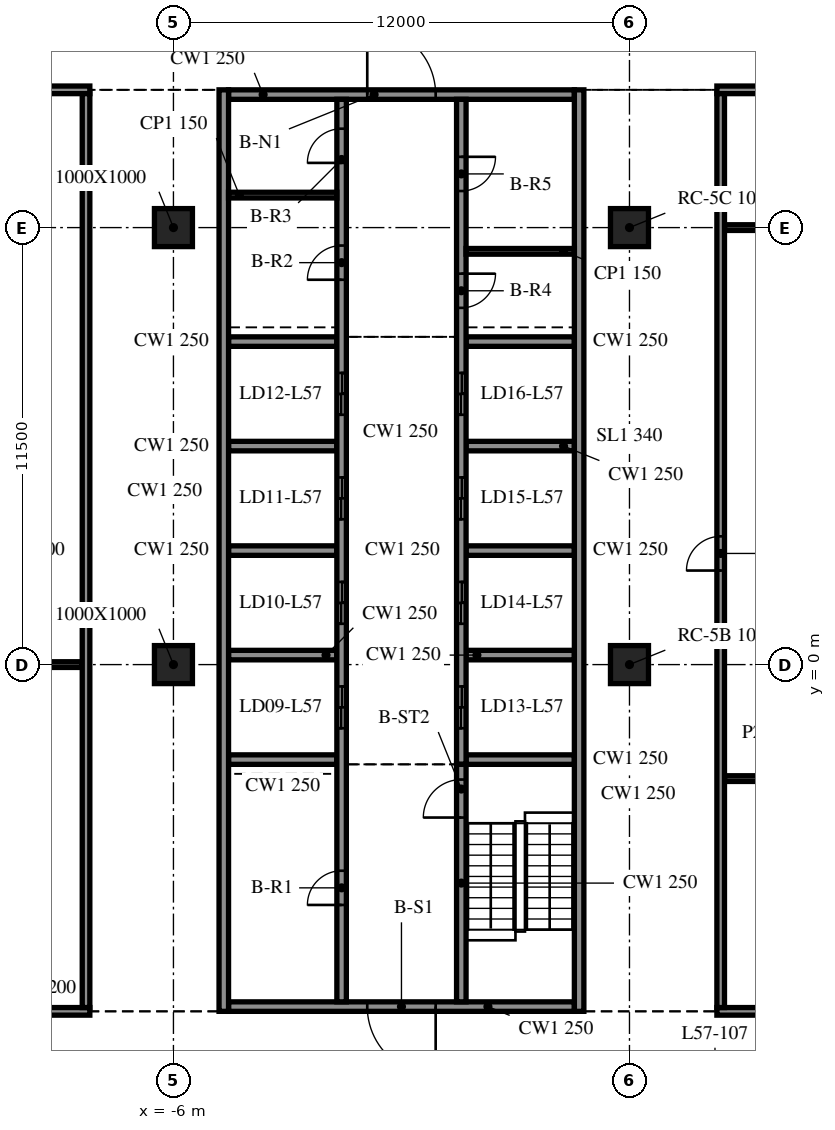
"""IFC4 building model, lengths in metres.
Left out: names, types, materials, properties, quantities, classifications, styles, units other than length and angle.
Written with IfcOpenShell. Run it as: python <this file> out.ifc"""

import sys

from ifc_helpers import new_model, si_unit, direction, frame, frame_2d, origin, origin_2d, place, context, subcontext, project, spatial, rectangle, extrude, element, fill, save


model = new_model("IFC4")
c1 = context("Model", 3, precision=1e-05, world=origin(), true_north=direction((0.0, 1.0)))
c2 = subcontext(c1, "Body", "Model", "MODEL_VIEW")
j1 = project(units=[si_unit("LENGTHUNIT", "METRE"), si_unit("PLANEANGLEUNIT", "RADIAN")], contexts=[c1])
p1 = place(None, origin())
s1 = spatial("IfcSite", under=j1, at=p1, CompositionType="ELEMENT")
p2 = place(p1, origin())
s2 = spatial("IfcBuilding", under=s1, at=p2, CompositionType="ELEMENT")
p3 = place(p2, frame((0.0, 0.0, 236.2)))
s3 = spatial("IfcBuildingStorey", under=s2, at=p3, CompositionType="ELEMENT", Elevation=236.2)
for number, where, z_axis, x_axis in (
    (1, (-6.0, 0.0, -0.34), (0.0, 0.0, 1.0), (1.0, 0.0, 0.0)),
    (2, (-6.0, 11.5, -0.34), (0.0, 0.0, 1.0), (1.0, 0.0, 0.0)),
    (3, (6.0, 0.0, -0.34), (0.0, 0.0, 1.0), (1.0, 0.0, 0.0)),
    (4, (6.0, 11.5, -0.34), (0.0, 0.0, 1.0), (1.0, 0.0, 0.0)),
):
    element("IfcColumn", number, at=place(p3, frame(where, z_axis=z_axis, x_axis=x_axis)), inside=s3, PredefinedType="COLUMN", context=c2, shape_type="SweptSolid", body=[
        extrude(rectangle(XDim=1.0, YDim=1.0, at=origin_2d()), origin(), (0.0, 0.0, 1.0), 3.8),
    ])
for number, where, z_axis, x_axis in (
    (5, (-4.675, 15.125, 0.0), (0.0, 0.0, 1.0), (0.0, -1.0, 0.0)),
    (6, (4.675, -9.125, 0.0), (0.0, 0.0, 1.0), (0.0, 1.0, 0.0)),
):
    element("IfcWall", number, at=place(p3, frame(where, z_axis=z_axis, x_axis=x_axis)), inside=s3, PredefinedType="SOLIDWALL", context=c2, shape_type="SweptSolid", body=[
        extrude(rectangle(XDim=24.25, YDim=0.25, at=frame_2d((12.125, 0.0))), origin(), (0.0, 0.0, 1.0), 3.46),
    ])
p4 = place(p3, frame((4.55, -9.0, 0.0), z_axis=(0.0, 0.0, 1.0), x_axis=(-1.0, 0.0, 0.0)))
e7 = element("IfcWall", 7, at=p4, inside=s3, PredefinedType="SOLIDWALL", context=c2, shape_type="SweptSolid", body=[
    extrude(rectangle(XDim=9.1, YDim=0.25, at=frame_2d((4.55, 0.0))), origin(), (0.0, 0.0, 1.0), 3.46),
])
p5 = place(p4, frame((3.65, 0.0, 0.0)))
e8 = element("IfcOpeningElement", 8, at=p5, cuts=e7, PredefinedType="OPENING", context=c2, shape_type="SweptSolid", body=[
    extrude(rectangle(XDim=1.8, YDim=2.1, at=frame_2d((0.9, 1.05))), frame((0.0, 0.135, 0.0), z_axis=(0.0, -1.0, 0.0), x_axis=(1.0, 0.0, 0.0)), (0.0, 0.0, 1.0), 0.27),
])
p6 = place(p3, frame((-4.55, 15.0, 0.0), z_axis=(0.0, 0.0, 1.0), x_axis=(1.0, 0.0, 0.0)))
e9 = element("IfcWall", 9, at=p6, inside=s3, PredefinedType="SOLIDWALL", context=c2, shape_type="SweptSolid", body=[
    extrude(rectangle(XDim=9.1, YDim=0.25, at=frame_2d((4.55, 0.0))), origin(), (0.0, 0.0, 1.0), 3.46),
])
p7 = place(p6, frame((3.65, 0.0, 0.0)))
e10 = element("IfcOpeningElement", 10, at=p7, cuts=e9, PredefinedType="OPENING", context=c2, shape_type="SweptSolid", body=[
    extrude(rectangle(XDim=1.8, YDim=2.1, at=frame_2d((0.9, 1.05))), frame((0.0, 0.135, 0.0), z_axis=(0.0, -1.0, 0.0), x_axis=(1.0, 0.0, 0.0)), (0.0, 0.0, 1.0), 0.27),
])
p8 = place(p3, frame((-1.575, -8.875, 0.0), z_axis=(0.0, 0.0, 1.0), x_axis=(0.0, 1.0, 0.0)))
e11 = element("IfcWall", 11, at=p8, inside=s3, PredefinedType="SOLIDWALL", context=c2, shape_type="SweptSolid", body=[
    extrude(rectangle(XDim=23.75, YDim=0.25, at=frame_2d((11.875, 0.0))), origin(), (0.0, 0.0, 1.0), 3.46),
])
p9 = place(p8, frame((7.2, 0.0, 0.0)))
e12 = element("IfcOpeningElement", 12, at=p9, cuts=e11, PredefinedType="OPENING", context=c2, shape_type="SweptSolid", body=[
    extrude(rectangle(XDim=1.1, YDim=2.1, at=frame_2d((0.55, 1.05))), frame((0.0, 0.135, 0.0), z_axis=(0.0, -1.0, 0.0), x_axis=(1.0, 0.0, 0.0)), (0.0, 0.0, 1.0), 0.27),
])
p10 = place(p8, frame((9.95, 0.0, 0.0)))
e13 = element("IfcOpeningElement", 13, at=p10, cuts=e11, PredefinedType="OPENING", context=c2, shape_type="SweptSolid", body=[
    extrude(rectangle(XDim=1.1, YDim=2.1, at=frame_2d((0.55, 1.05))), frame((0.0, 0.135, 0.0), z_axis=(0.0, -1.0, 0.0), x_axis=(1.0, 0.0, 0.0)), (0.0, 0.0, 1.0), 0.27),
])
p11 = place(p8, frame((12.7, 0.0, 0.0)))
e14 = element("IfcOpeningElement", 14, at=p11, cuts=e11, PredefinedType="OPENING", context=c2, shape_type="SweptSolid", body=[
    extrude(rectangle(XDim=1.1, YDim=2.1, at=frame_2d((0.55, 1.05))), frame((0.0, 0.135, 0.0), z_axis=(0.0, -1.0, 0.0), x_axis=(1.0, 0.0, 0.0)), (0.0, 0.0, 1.0), 0.27),
])
p12 = place(p8, frame((15.45, 0.0, 0.0)))
e15 = element("IfcOpeningElement", 15, at=p12, cuts=e11, PredefinedType="OPENING", context=c2, shape_type="SweptSolid", body=[
    extrude(rectangle(XDim=1.1, YDim=2.1, at=frame_2d((0.55, 1.05))), frame((0.0, 0.135, 0.0), z_axis=(0.0, -1.0, 0.0), x_axis=(1.0, 0.0, 0.0)), (0.0, 0.0, 1.0), 0.27),
])
p13 = place(p8, frame((2.55, 0.0, 0.0)))
e16 = element("IfcOpeningElement", 16, at=p13, cuts=e11, PredefinedType="OPENING", context=c2, shape_type="SweptSolid", body=[
    extrude(rectangle(XDim=0.9, YDim=2.1, at=frame_2d((0.45, 1.05))), frame((0.0, 0.135, 0.0), z_axis=(0.0, -1.0, 0.0), x_axis=(1.0, 0.0, 0.0)), (0.0, 0.0, 1.0), 0.27),
])
p14 = place(p8, frame((19.002, 0.0, 0.0)))
e17 = element("IfcOpeningElement", 17, at=p14, cuts=e11, PredefinedType="OPENING", context=c2, shape_type="SweptSolid", body=[
    extrude(rectangle(XDim=0.9, YDim=2.1, at=frame_2d((0.45, 1.05))), frame((0.0, 0.135, 0.0), z_axis=(0.0, -1.0, 0.0), x_axis=(1.0, 0.0, 0.0)), (0.0, 0.0, 1.0), 0.27),
])
p15 = place(p8, frame((22.077, 0.0, 0.0)))
e18 = element("IfcOpeningElement", 18, at=p15, cuts=e11, PredefinedType="OPENING", context=c2, shape_type="SweptSolid", body=[
    extrude(rectangle(XDim=0.9, YDim=2.1, at=frame_2d((0.45, 1.05))), frame((0.0, 0.135, 0.0), z_axis=(0.0, -1.0, 0.0), x_axis=(1.0, 0.0, 0.0)), (0.0, 0.0, 1.0), 0.27),
])
p16 = place(p3, frame((1.575, -8.875, 0.0), z_axis=(0.0, 0.0, 1.0), x_axis=(0.0, 1.0, 0.0)))
e19 = element("IfcWall", 19, at=p16, inside=s3, PredefinedType="SOLIDWALL", context=c2, shape_type="SweptSolid", body=[
    extrude(rectangle(XDim=6.25, YDim=0.25, at=frame_2d((3.125, 0.0))), origin(), (0.0, 0.0, 1.0), 3.46),
])
p17 = place(p16, frame((4.85, 0.0, 0.0)))
e20 = element("IfcOpeningElement", 20, at=p17, cuts=e19, PredefinedType="OPENING", context=c2, shape_type="SweptSolid", body=[
    extrude(rectangle(XDim=1.0, YDim=2.1, at=frame_2d((0.5, 1.05))), frame((0.0, 0.135, 0.0), z_axis=(0.0, -1.0, 0.0), x_axis=(1.0, 0.0, 0.0)), (0.0, 0.0, 1.0), 0.27),
])
p18 = place(p3, frame((1.575, 14.875, 0.0), z_axis=(0.0, 0.0, 1.0), x_axis=(0.0, -1.0, 0.0)))
e21 = element("IfcWall", 21, at=p18, inside=s3, PredefinedType="SOLIDWALL", context=c2, shape_type="SweptSolid", body=[
    extrude(rectangle(XDim=17.5, YDim=0.25, at=frame_2d((8.75, 0.0))), origin(), (0.0, 0.0, 1.0), 3.46),
])
p19 = place(p18, frame((15.45, 0.0, 0.0)))
e22 = element("IfcOpeningElement", 22, at=p19, cuts=e21, PredefinedType="OPENING", context=c2, shape_type="SweptSolid", body=[
    extrude(rectangle(XDim=1.1, YDim=2.1, at=frame_2d((0.55, 1.05))), frame((0.0, 0.135, 0.0), z_axis=(0.0, -1.0, 0.0), x_axis=(1.0, 0.0, 0.0)), (0.0, 0.0, 1.0), 0.27),
])
p20 = place(p18, frame((12.7, 0.0, 0.0)))
e23 = element("IfcOpeningElement", 23, at=p20, cuts=e21, PredefinedType="OPENING", context=c2, shape_type="SweptSolid", body=[
    extrude(rectangle(XDim=1.1, YDim=2.1, at=frame_2d((0.55, 1.05))), frame((0.0, 0.135, 0.0), z_axis=(0.0, -1.0, 0.0), x_axis=(1.0, 0.0, 0.0)), (0.0, 0.0, 1.0), 0.27),
])
p21 = place(p18, frame((9.95, 0.0, 0.0)))
e24 = element("IfcOpeningElement", 24, at=p21, cuts=e21, PredefinedType="OPENING", context=c2, shape_type="SweptSolid", body=[
    extrude(rectangle(XDim=1.1, YDim=2.1, at=frame_2d((0.55, 1.05))), frame((0.0, 0.135, 0.0), z_axis=(0.0, -1.0, 0.0), x_axis=(1.0, 0.0, 0.0)), (0.0, 0.0, 1.0), 0.27),
])
p22 = place(p18, frame((7.2, 0.0, 0.0)))
e25 = element("IfcOpeningElement", 25, at=p22, cuts=e21, PredefinedType="OPENING", context=c2, shape_type="SweptSolid", body=[
    extrude(rectangle(XDim=1.1, YDim=2.1, at=frame_2d((0.55, 1.05))), frame((0.0, 0.135, 0.0), z_axis=(0.0, -1.0, 0.0), x_axis=(1.0, 0.0, 0.0)), (0.0, 0.0, 1.0), 0.27),
])
p23 = place(p18, frame((4.587, 0.0, 0.0)))
e26 = element("IfcOpeningElement", 26, at=p23, cuts=e21, PredefinedType="OPENING", context=c2, shape_type="SweptSolid", body=[
    extrude(rectangle(XDim=0.9, YDim=2.1, at=frame_2d((0.45, 1.05))), frame((0.0, 0.135, 0.0), z_axis=(0.0, -1.0, 0.0), x_axis=(1.0, 0.0, 0.0)), (0.0, 0.0, 1.0), 0.27),
])
p24 = place(p18, frame((1.512, 0.0, 0.0)))
e27 = element("IfcOpeningElement", 27, at=p24, cuts=e21, PredefinedType="OPENING", context=c2, shape_type="SweptSolid", body=[
    extrude(rectangle(XDim=0.9, YDim=2.1, at=frame_2d((0.45, 1.05))), frame((0.0, 0.135, 0.0), z_axis=(0.0, -1.0, 0.0), x_axis=(1.0, 0.0, 0.0)), (0.0, 0.0, 1.0), 0.27),
])
for number, where, z_axis, x_axis in (
    (28, (-4.55, -2.5, 0.0), (0.0, 0.0, 1.0), (1.0, 0.0, 0.0)),
    (29, (-4.55, 0.25, 0.0), (0.0, 0.0, 1.0), (1.0, 0.0, 0.0)),
    (30, (-4.55, 3.0, 0.0), (0.0, 0.0, 1.0), (1.0, 0.0, 0.0)),
    (31, (-4.55, 5.75, 0.0), (0.0, 0.0, 1.0), (1.0, 0.0, 0.0)),
    (32, (-4.55, 8.5, 0.0), (0.0, 0.0, 1.0), (1.0, 0.0, 0.0)),
    (33, (1.7, -2.5, 0.0), (0.0, 0.0, 1.0), (1.0, 0.0, 0.0)),
    (34, (1.7, 0.25, 0.0), (0.0, 0.0, 1.0), (1.0, 0.0, 0.0)),
    (35, (1.7, 3.0, 0.0), (0.0, 0.0, 1.0), (1.0, 0.0, 0.0)),
    (36, (1.7, 5.75, 0.0), (0.0, 0.0, 1.0), (1.0, 0.0, 0.0)),
    (37, (1.7, 8.5, 0.0), (0.0, 0.0, 1.0), (1.0, 0.0, 0.0)),
):
    element("IfcWall", number, at=place(p3, frame(where, z_axis=z_axis, x_axis=x_axis)), inside=s3, PredefinedType="SOLIDWALL", context=c2, shape_type="SweptSolid", body=[
        extrude(rectangle(XDim=2.85, YDim=0.25, at=frame_2d((1.425, 0.0))), origin(), (0.0, 0.0, 1.0), 3.46),
    ])
for number, where, z_axis, x_axis in (
    (38, (-4.55, 12.355, 0.0), (0.0, 0.0, 1.0), (1.0, 0.0, 0.0)),
    (39, (1.7, 10.875, 0.0), (0.0, 0.0, 1.0), (1.0, 0.0, 0.0)),
):
    element("IfcWall", number, at=place(p3, frame(where, z_axis=z_axis, x_axis=x_axis)), inside=s3, PredefinedType="PARTITIONING", context=c2, shape_type="SweptSolid", body=[
        extrude(rectangle(XDim=2.85, YDim=0.15, at=frame_2d((1.425, 0.0))), origin(), (0.0, 0.0, 1.0), 3.46),
    ])
p25 = place(p3, frame((-15.9, -9.125, 0.0), z_axis=(0.0, 0.0, 1.0), x_axis=(1.0, 0.0, 0.0)))
e40 = element("IfcWall", 40, at=p25, inside=s3, PredefinedType="PARTITIONING", context=c2, shape_type="SweptSolid", body=[
    extrude(rectangle(XDim=7.7, YDim=0.2, at=frame_2d((3.85, 0.0))), origin(), (0.0, 0.0, 1.0), 3.46),
])
p26 = place(p25, frame((3.3, 0.0, 0.0)))
e41 = element("IfcOpeningElement", 41, at=p26, cuts=e40, PredefinedType="OPENING", context=c2, shape_type="SweptSolid", body=[
    extrude(rectangle(XDim=0.9, YDim=2.1, at=frame_2d((0.45, 1.05))), frame((0.0, 0.11, 0.0), z_axis=(0.0, -1.0, 0.0), x_axis=(1.0, 0.0, 0.0)), (0.0, 0.0, 1.0), 0.22),
])
p27 = place(p3, frame((8.3, -9.125, 0.0), z_axis=(0.0, 0.0, 1.0), x_axis=(1.0, 0.0, 0.0)))
e42 = element("IfcWall", 42, at=p27, inside=s3, PredefinedType="PARTITIONING", context=c2, shape_type="SweptSolid", body=[
    extrude(rectangle(XDim=7.3, YDim=0.2, at=frame_2d((3.65, 0.0))), origin(), (0.0, 0.0, 1.0), 3.46),
])
p28 = place(p27, frame((3.1, 0.0, 0.0)))
e43 = element("IfcOpeningElement", 43, at=p28, cuts=e42, PredefinedType="OPENING", context=c2, shape_type="SweptSolid", body=[
    extrude(rectangle(XDim=0.9, YDim=2.1, at=frame_2d((0.45, 1.05))), frame((0.0, 0.11, 0.0), z_axis=(0.0, -1.0, 0.0), x_axis=(1.0, 0.0, 0.0)), (0.0, 0.0, 1.0), 0.22),
])
p29 = place(p3, frame((8.5, -3.0, 0.0), z_axis=(0.0, 0.0, 1.0), x_axis=(1.0, 0.0, 0.0)))
e44 = element("IfcWall", 44, at=p29, inside=s3, PredefinedType="PARTITIONING", context=c2, shape_type="SweptSolid", body=[
    extrude(rectangle(XDim=6.9, YDim=0.15, at=frame_2d((3.45, 0.0))), origin(), (0.0, 0.0, 1.0), 3.46),
])
p30 = place(p3, frame((-15.7, 0.0, 0.0), z_axis=(0.0, 0.0, 1.0), x_axis=(1.0, 0.0, 0.0)))
e45 = element("IfcWall", 45, at=p30, inside=s3, PredefinedType="PARTITIONING", context=c2, shape_type="SweptSolid", body=[
    extrude(rectangle(XDim=7.3, YDim=0.15, at=frame_2d((3.65, 0.0))), origin(), (0.0, 0.0, 1.0), 3.46),
])
p31 = place(p3, frame((8.5, 11.5, 0.0), z_axis=(0.0, 0.0, 1.0), x_axis=(1.0, 0.0, 0.0)))
e46 = element("IfcWall", 46, at=p31, inside=s3, PredefinedType="PARTITIONING", context=c2, shape_type="SweptSolid", body=[
    extrude(rectangle(XDim=6.9, YDim=0.15, at=frame_2d((3.45, 0.0))), origin(), (0.0, 0.0, 1.0), 3.46),
])
p32 = place(p3, frame((-15.9, 15.125, 0.0), z_axis=(0.0, 0.0, 1.0), x_axis=(1.0, 0.0, 0.0)))
e47 = element("IfcWall", 47, at=p32, inside=s3, PredefinedType="PARTITIONING", context=c2, shape_type="SweptSolid", body=[
    extrude(rectangle(XDim=7.7, YDim=0.2, at=frame_2d((3.85, 0.0))), origin(), (0.0, 0.0, 1.0), 3.46),
])
p33 = place(p3, frame((8.3, 15.125, 0.0), z_axis=(0.0, 0.0, 1.0), x_axis=(1.0, 0.0, 0.0)))
e48 = element("IfcWall", 48, at=p33, inside=s3, PredefinedType="PARTITIONING", context=c2, shape_type="SweptSolid", body=[
    extrude(rectangle(XDim=7.3, YDim=0.2, at=frame_2d((3.65, 0.0))), origin(), (0.0, 0.0, 1.0), 3.46),
])
p34 = place(p33, frame((3.1, 0.0, 0.0)))
e49 = element("IfcOpeningElement", 49, at=p34, cuts=e48, PredefinedType="OPENING", context=c2, shape_type="SweptSolid", body=[
    extrude(rectangle(XDim=0.9, YDim=2.1, at=frame_2d((0.45, 1.05))), frame((0.0, 0.11, 0.0), z_axis=(0.0, -1.0, 0.0), x_axis=(1.0, 0.0, 0.0)), (0.0, 0.0, 1.0), 0.22),
])
p35 = place(p3, frame((-8.3, -9.025, 0.0), z_axis=(0.0, 0.0, 1.0), x_axis=(0.0, 1.0, 0.0)))
e50 = element("IfcWall", 50, at=p35, inside=s3, PredefinedType="PARTITIONING", context=c2, shape_type="SweptSolid", body=[
    extrude(rectangle(XDim=24.05, YDim=0.2, at=frame_2d((12.025, 0.0))), origin(), (0.0, 0.0, 1.0), 3.46),
])
p36 = place(p3, frame((8.4, -9.025, 0.0), z_axis=(0.0, 0.0, 1.0), x_axis=(0.0, 1.0, 0.0)))
e51 = element("IfcWall", 51, at=p36, inside=s3, PredefinedType="PARTITIONING", context=c2, shape_type="SweptSolid", body=[
    extrude(rectangle(XDim=24.05, YDim=0.2, at=frame_2d((12.025, 0.0))), origin(), (0.0, 0.0, 1.0), 3.46),
])
p37 = place(p36, frame((11.5, 0.0, 0.0)))
e52 = element("IfcOpeningElement", 52, at=p37, cuts=e51, PredefinedType="OPENING", context=c2, shape_type="SweptSolid", body=[
    extrude(rectangle(XDim=0.9, YDim=2.1, at=frame_2d((0.45, 1.05))), frame((0.0, 0.11, 0.0), z_axis=(0.0, -1.0, 0.0), x_axis=(1.0, 0.0, 0.0)), (0.0, 0.0, 1.0), 0.22),
])
p38 = place(p5, origin())
e53 = element("IfcDoor", 53, at=p38, inside=s3, OperationType="DOUBLE_DOOR_SINGLE_SWING", PredefinedType="DOOR", context=c2, shape_type="SweptSolid", body=[
    extrude(rectangle(XDim=1.8, YDim=2.1, at=frame_2d((0.9, 1.05))), frame((0.0, 0.025, 0.0), z_axis=(0.0, -1.0, 0.0), x_axis=(1.0, 0.0, 0.0)), (0.0, 0.0, 1.0), 0.05),
])
fill(e8, e53)
p39 = place(p7, origin())
e54 = element("IfcDoor", 54, at=p39, inside=s3, OperationType="DOUBLE_DOOR_SINGLE_SWING", PredefinedType="DOOR", context=c2, shape_type="SweptSolid", body=[
    extrude(rectangle(XDim=1.8, YDim=2.1, at=frame_2d((0.9, 1.05))), frame((0.0, 0.025, 0.0), z_axis=(0.0, -1.0, 0.0), x_axis=(1.0, 0.0, 0.0)), (0.0, 0.0, 1.0), 0.05),
])
fill(e10, e54)
p40 = place(p19, origin())
e55 = element("IfcDoor", 55, at=p40, inside=s3, OperationType="DOUBLE_DOOR_SLIDING", PredefinedType="DOOR", context=c2, shape_type="SweptSolid", body=[
    extrude(rectangle(XDim=1.1, YDim=2.1, at=frame_2d((0.55, 1.05))), frame((0.0, 0.025, 0.0), z_axis=(0.0, -1.0, 0.0), x_axis=(1.0, 0.0, 0.0)), (0.0, 0.0, 1.0), 0.05),
])
fill(e22, e55)
p41 = place(p20, origin())
e56 = element("IfcDoor", 56, at=p41, inside=s3, OperationType="DOUBLE_DOOR_SLIDING", PredefinedType="DOOR", context=c2, shape_type="SweptSolid", body=[
    extrude(rectangle(XDim=1.1, YDim=2.1, at=frame_2d((0.55, 1.05))), frame((0.0, 0.025, 0.0), z_axis=(0.0, -1.0, 0.0), x_axis=(1.0, 0.0, 0.0)), (0.0, 0.0, 1.0), 0.05),
])
fill(e23, e56)
p42 = place(p21, origin())
e57 = element("IfcDoor", 57, at=p42, inside=s3, OperationType="DOUBLE_DOOR_SLIDING", PredefinedType="DOOR", context=c2, shape_type="SweptSolid", body=[
    extrude(rectangle(XDim=1.1, YDim=2.1, at=frame_2d((0.55, 1.05))), frame((0.0, 0.025, 0.0), z_axis=(0.0, -1.0, 0.0), x_axis=(1.0, 0.0, 0.0)), (0.0, 0.0, 1.0), 0.05),
])
fill(e24, e57)
p43 = place(p22, origin())
e58 = element("IfcDoor", 58, at=p43, inside=s3, OperationType="DOUBLE_DOOR_SLIDING", PredefinedType="DOOR", context=c2, shape_type="SweptSolid", body=[
    extrude(rectangle(XDim=1.1, YDim=2.1, at=frame_2d((0.55, 1.05))), frame((0.0, 0.025, 0.0), z_axis=(0.0, -1.0, 0.0), x_axis=(1.0, 0.0, 0.0)), (0.0, 0.0, 1.0), 0.05),
])
fill(e25, e58)
p44 = place(p9, origin())
e59 = element("IfcDoor", 59, at=p44, inside=s3, OperationType="DOUBLE_DOOR_SLIDING", PredefinedType="DOOR", context=c2, shape_type="SweptSolid", body=[
    extrude(rectangle(XDim=1.1, YDim=2.1, at=frame_2d((0.55, 1.05))), frame((0.0, 0.025, 0.0), z_axis=(0.0, -1.0, 0.0), x_axis=(1.0, 0.0, 0.0)), (0.0, 0.0, 1.0), 0.05),
])
fill(e12, e59)
p45 = place(p10, origin())
e60 = element("IfcDoor", 60, at=p45, inside=s3, OperationType="DOUBLE_DOOR_SLIDING", PredefinedType="DOOR", context=c2, shape_type="SweptSolid", body=[
    extrude(rectangle(XDim=1.1, YDim=2.1, at=frame_2d((0.55, 1.05))), frame((0.0, 0.025, 0.0), z_axis=(0.0, -1.0, 0.0), x_axis=(1.0, 0.0, 0.0)), (0.0, 0.0, 1.0), 0.05),
])
fill(e13, e60)
p46 = place(p11, origin())
e61 = element("IfcDoor", 61, at=p46, inside=s3, OperationType="DOUBLE_DOOR_SLIDING", PredefinedType="DOOR", context=c2, shape_type="SweptSolid", body=[
    extrude(rectangle(XDim=1.1, YDim=2.1, at=frame_2d((0.55, 1.05))), frame((0.0, 0.025, 0.0), z_axis=(0.0, -1.0, 0.0), x_axis=(1.0, 0.0, 0.0)), (0.0, 0.0, 1.0), 0.05),
])
fill(e14, e61)
p47 = place(p12, origin())
e62 = element("IfcDoor", 62, at=p47, inside=s3, OperationType="DOUBLE_DOOR_SLIDING", PredefinedType="DOOR", context=c2, shape_type="SweptSolid", body=[
    extrude(rectangle(XDim=1.1, YDim=2.1, at=frame_2d((0.55, 1.05))), frame((0.0, 0.025, 0.0), z_axis=(0.0, -1.0, 0.0), x_axis=(1.0, 0.0, 0.0)), (0.0, 0.0, 1.0), 0.05),
])
fill(e15, e62)
p48 = place(p13, origin())
e63 = element("IfcDoor", 63, at=p48, inside=s3, OperationType="SINGLE_SWING_LEFT", PredefinedType="DOOR", context=c2, shape_type="SweptSolid", body=[
    extrude(rectangle(XDim=0.9, YDim=2.1, at=frame_2d((0.45, 1.05))), frame((0.0, 0.025, 0.0), z_axis=(0.0, -1.0, 0.0), x_axis=(1.0, 0.0, 0.0)), (0.0, 0.0, 1.0), 0.05),
])
fill(e16, e63)
p49 = place(p14, origin())
e64 = element("IfcDoor", 64, at=p49, inside=s3, OperationType="SINGLE_SWING_RIGHT", PredefinedType="DOOR", context=c2, shape_type="SweptSolid", body=[
    extrude(rectangle(XDim=0.9, YDim=2.1, at=frame_2d((0.45, 1.05))), frame((0.0, 0.025, 0.0), z_axis=(0.0, -1.0, 0.0), x_axis=(1.0, 0.0, 0.0)), (0.0, 0.0, 1.0), 0.05),
])
fill(e17, e64)
p50 = place(p15, origin())
e65 = element("IfcDoor", 65, at=p50, inside=s3, OperationType="SINGLE_SWING_LEFT", PredefinedType="DOOR", context=c2, shape_type="SweptSolid", body=[
    extrude(rectangle(XDim=0.9, YDim=2.1, at=frame_2d((0.45, 1.05))), frame((0.0, 0.025, 0.0), z_axis=(0.0, -1.0, 0.0), x_axis=(1.0, 0.0, 0.0)), (0.0, 0.0, 1.0), 0.05),
])
fill(e18, e65)
p51 = place(p23, origin())
e66 = element("IfcDoor", 66, at=p51, inside=s3, OperationType="SINGLE_SWING_RIGHT", PredefinedType="DOOR", context=c2, shape_type="SweptSolid", body=[
    extrude(rectangle(XDim=0.9, YDim=2.1, at=frame_2d((0.45, 1.05))), frame((0.0, 0.025, 0.0), z_axis=(0.0, -1.0, 0.0), x_axis=(1.0, 0.0, 0.0)), (0.0, 0.0, 1.0), 0.05),
])
fill(e26, e66)
p52 = place(p24, origin())
e67 = element("IfcDoor", 67, at=p52, inside=s3, OperationType="SINGLE_SWING_LEFT", PredefinedType="DOOR", context=c2, shape_type="SweptSolid", body=[
    extrude(rectangle(XDim=0.9, YDim=2.1, at=frame_2d((0.45, 1.05))), frame((0.0, 0.025, 0.0), z_axis=(0.0, -1.0, 0.0), x_axis=(1.0, 0.0, 0.0)), (0.0, 0.0, 1.0), 0.05),
])
fill(e27, e67)
p53 = place(p17, origin())
e68 = element("IfcDoor", 68, at=p53, inside=s3, OperationType="SINGLE_SWING_RIGHT", PredefinedType="DOOR", context=c2, shape_type="SweptSolid", body=[
    extrude(rectangle(XDim=1.0, YDim=2.1, at=frame_2d((0.5, 1.05))), frame((0.0, 0.025, 0.0), z_axis=(0.0, -1.0, 0.0), x_axis=(1.0, 0.0, 0.0)), (0.0, 0.0, 1.0), 0.05),
])
fill(e20, e68)
p54 = place(p37, origin())
e69 = element("IfcDoor", 69, at=p54, inside=s3, OperationType="SINGLE_SWING_RIGHT", PredefinedType="DOOR", context=c2, shape_type="SweptSolid", body=[
    extrude(rectangle(XDim=0.9, YDim=2.1, at=frame_2d((0.45, 1.05))), frame((0.0, 0.025, 0.0), z_axis=(0.0, -1.0, 0.0), x_axis=(1.0, 0.0, 0.0)), (0.0, 0.0, 1.0), 0.05),
])
fill(e52, e69)
save(model, sys.argv[1])
